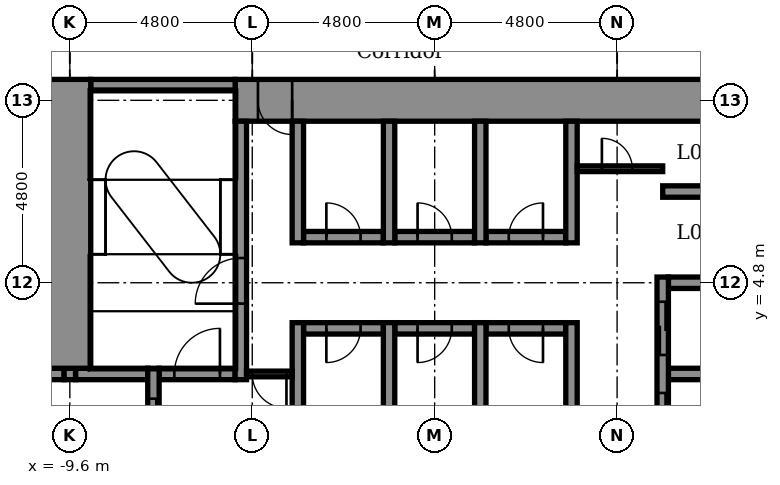
"""IFC4 building model, lengths in metres.
Left out: names, types, materials, properties, quantities, classifications, styles, units other than length and angle.
Written with IfcOpenShell. Run it as: python <this file> out.ifc"""

import sys

from ifc_helpers import new_model, si_unit, direction, frame, frame_2d, origin, place, context, subcontext, project, spatial, rectangle, extrude, element, fill, save


model = new_model("IFC4")
c1 = context("Model", 3, precision=1e-05, world=origin(), true_north=direction((0.0, 1.0)))
c2 = subcontext(c1, "Body", "Model", "MODEL_VIEW")
j1 = project(units=[si_unit("LENGTHUNIT", "METRE"), si_unit("PLANEANGLEUNIT", "RADIAN")], contexts=[c1])
p1 = place(None, origin())
s1 = spatial("IfcSite", under=j1, at=p1, CompositionType="ELEMENT")
p2 = place(p1, origin())
s2 = spatial("IfcBuilding", under=s1, at=p2, CompositionType="ELEMENT")
p3 = place(p2, frame((0.0, 0.0, 38.9)))
s3 = spatial("IfcBuildingStorey", under=s2, at=p3, CompositionType="ELEMENT", Elevation=38.9)
p4 = place(p3, frame((-10.85, 2.4, -0.25), z_axis=(0.0, 0.0, 1.0), x_axis=(1.0, 0.0, 0.0)))
e1 = element("IfcWall", 1, at=p4, inside=s3, PredefinedType="STANDARD", context=c2, shape_type="SweptSolid", body=[
    extrude(rectangle(XDim=1.1, YDim=0.3, at=frame_2d((0.55, 0.0))), origin(), (0.0, 0.0, 1.0), 5.5),
])
p5 = place(p3, frame((-9.45, 2.4, -0.25), z_axis=(0.0, 0.0, 1.0), x_axis=(1.0, 0.0, 0.0)))
e2 = element("IfcWall", 2, at=p5, inside=s3, PredefinedType="STANDARD", context=c2, shape_type="SweptSolid", body=[
    extrude(rectangle(XDim=1.9, YDim=0.3, at=frame_2d((0.95, 0.0))), origin(), (0.0, 0.0, 1.0), 5.5),
])
p6 = place(p3, frame((-7.25, 2.4, -0.25), z_axis=(0.0, 0.0, 1.0), x_axis=(1.0, 0.0, 0.0)))
e3 = element("IfcWall", 3, at=p6, inside=s3, PredefinedType="STANDARD", context=c2, shape_type="SweptSolid", body=[
    extrude(rectangle(XDim=2.0, YDim=0.3, at=frame_2d((1.0, 0.0))), origin(), (0.0, 0.0, 1.0), 5.5),
])
p7 = place(p6, frame((0.4, 0.0, 0.25)))
e4 = element("IfcOpeningElement", 4, at=p7, cuts=e3, PredefinedType="OPENING", context=c2, shape_type="SweptSolid", body=[
    extrude(rectangle(XDim=1.2, YDim=2.1, at=frame_2d((0.6, 1.05))), frame((0.0, 0.16, 0.0), z_axis=(0.0, -1.0, 0.0), x_axis=(1.0, 0.0, 0.0)), (0.0, 0.0, 1.0), 0.32),
])
p8 = place(p3, frame((6.15, 2.4, -0.25), z_axis=(0.0, 0.0, 1.0), x_axis=(1.0, 0.0, 0.0)))
e5 = element("IfcWall", 5, at=p8, inside=s3, PredefinedType="STANDARD", context=c2, shape_type="SweptSolid", body=[
    extrude(rectangle(XDim=2.9, YDim=0.3, at=frame_2d((1.45, 0.0))), origin(), (0.0, 0.0, 1.0), 5.5),
])
p9 = place(p3, frame((-3.45, 3.6, -0.25), z_axis=(0.0, 0.0, 1.0), x_axis=(1.0, 0.0, 0.0)))
e6 = element("IfcWall", 6, at=p9, inside=s3, PredefinedType="STANDARD", context=c2, shape_type="SweptSolid", body=[
    extrude(rectangle(XDim=2.1, YDim=0.3, at=frame_2d((1.05, 0.0))), origin(), (0.0, 0.0, 1.0), 5.5),
])
p10 = place(p9, frame((0.6, 0.0, 0.25)))
e7 = element("IfcOpeningElement", 7, at=p10, cuts=e6, PredefinedType="OPENING", context=c2, shape_type="SweptSolid", body=[
    extrude(rectangle(XDim=0.9, YDim=2.1, at=frame_2d((0.45, 1.05))), frame((0.0, 0.16, 0.0), z_axis=(0.0, -1.0, 0.0), x_axis=(1.0, 0.0, 0.0)), (0.0, 0.0, 1.0), 0.32),
])
p11 = place(p3, frame((-1.05, 3.6, -0.25), z_axis=(0.0, 0.0, 1.0), x_axis=(1.0, 0.0, 0.0)))
e8 = element("IfcWall", 8, at=p11, inside=s3, PredefinedType="STANDARD", context=c2, shape_type="SweptSolid", body=[
    extrude(rectangle(XDim=2.1, YDim=0.3, at=frame_2d((1.05, 0.0))), origin(), (0.0, 0.0, 1.0), 5.5),
])
p12 = place(p11, frame((0.6, 0.0, 0.25)))
e9 = element("IfcOpeningElement", 9, at=p12, cuts=e8, PredefinedType="OPENING", context=c2, shape_type="SweptSolid", body=[
    extrude(rectangle(XDim=0.9, YDim=2.1, at=frame_2d((0.45, 1.05))), frame((0.0, 0.16, 0.0), z_axis=(0.0, -1.0, 0.0), x_axis=(1.0, 0.0, 0.0)), (0.0, 0.0, 1.0), 0.32),
])
p13 = place(p3, frame((1.35, 3.6, -0.25), z_axis=(0.0, 0.0, 1.0), x_axis=(1.0, 0.0, 0.0)))
e10 = element("IfcWall", 10, at=p13, inside=s3, PredefinedType="STANDARD", context=c2, shape_type="SweptSolid", body=[
    extrude(rectangle(XDim=2.1, YDim=0.3, at=frame_2d((1.05, 0.0))), origin(), (0.0, 0.0, 1.0), 5.5),
])
p14 = place(p13, frame((0.6, 0.0, 0.25)))
e11 = element("IfcOpeningElement", 11, at=p14, cuts=e10, PredefinedType="OPENING", context=c2, shape_type="SweptSolid", body=[
    extrude(rectangle(XDim=0.9, YDim=2.1, at=frame_2d((0.45, 1.05))), frame((0.0, 0.16, 0.0), z_axis=(0.0, -1.0, 0.0), x_axis=(1.0, 0.0, 0.0)), (0.0, 0.0, 1.0), 0.32),
])
p15 = place(p3, frame((6.15, 4.8, -0.25), z_axis=(0.0, 0.0, 1.0), x_axis=(1.0, 0.0, 0.0)))
e12 = element("IfcWall", 12, at=p15, inside=s3, PredefinedType="STANDARD", context=c2, shape_type="SweptSolid", body=[
    extrude(rectangle(XDim=2.9, YDim=0.3, at=frame_2d((1.45, 0.0))), origin(), (0.0, 0.0, 1.0), 5.5),
])
p16 = place(p3, frame((-3.45, 6.0, -0.25), z_axis=(0.0, 0.0, 1.0), x_axis=(1.0, 0.0, 0.0)))
e13 = element("IfcWall", 13, at=p16, inside=s3, PredefinedType="STANDARD", context=c2, shape_type="SweptSolid", body=[
    extrude(rectangle(XDim=2.1, YDim=0.3, at=frame_2d((1.05, 0.0))), origin(), (0.0, 0.0, 1.0), 5.5),
])
p17 = place(p16, frame((0.6, 0.0, 0.25)))
e14 = element("IfcOpeningElement", 14, at=p17, cuts=e13, PredefinedType="OPENING", context=c2, shape_type="SweptSolid", body=[
    extrude(rectangle(XDim=0.9, YDim=2.1, at=frame_2d((0.45, 1.05))), frame((0.0, 0.16, 0.0), z_axis=(0.0, -1.0, 0.0), x_axis=(1.0, 0.0, 0.0)), (0.0, 0.0, 1.0), 0.32),
])
p18 = place(p3, frame((-1.05, 6.0, -0.25), z_axis=(0.0, 0.0, 1.0), x_axis=(1.0, 0.0, 0.0)))
e15 = element("IfcWall", 15, at=p18, inside=s3, PredefinedType="STANDARD", context=c2, shape_type="SweptSolid", body=[
    extrude(rectangle(XDim=2.1, YDim=0.3, at=frame_2d((1.05, 0.0))), origin(), (0.0, 0.0, 1.0), 5.5),
])
p19 = place(p18, frame((0.6, 0.0, 0.25)))
e16 = element("IfcOpeningElement", 16, at=p19, cuts=e15, PredefinedType="OPENING", context=c2, shape_type="SweptSolid", body=[
    extrude(rectangle(XDim=0.9, YDim=2.1, at=frame_2d((0.45, 1.05))), frame((0.0, 0.16, 0.0), z_axis=(0.0, -1.0, 0.0), x_axis=(1.0, 0.0, 0.0)), (0.0, 0.0, 1.0), 0.32),
])
p20 = place(p3, frame((1.35, 6.0, -0.25), z_axis=(0.0, 0.0, 1.0), x_axis=(1.0, 0.0, 0.0)))
e17 = element("IfcWall", 17, at=p20, inside=s3, PredefinedType="STANDARD", context=c2, shape_type="SweptSolid", body=[
    extrude(rectangle(XDim=2.1, YDim=0.3, at=frame_2d((1.05, 0.0))), origin(), (0.0, 0.0, 1.0), 5.5),
])
p21 = place(p20, frame((0.6, 0.0, 0.25)))
e18 = element("IfcOpeningElement", 18, at=p21, cuts=e17, PredefinedType="OPENING", context=c2, shape_type="SweptSolid", body=[
    extrude(rectangle(XDim=0.9, YDim=2.1, at=frame_2d((0.45, 1.05))), frame((0.0, 0.16, 0.0), z_axis=(0.0, -1.0, 0.0), x_axis=(1.0, 0.0, 0.0)), (0.0, 0.0, 1.0), 0.32),
])
p22 = place(p3, frame((6.0, 7.2, -0.25), z_axis=(0.0, 0.0, 1.0), x_axis=(1.0, 0.0, 0.0)))
e19 = element("IfcWall", 19, at=p22, inside=s3, PredefinedType="STANDARD", context=c2, shape_type="SweptSolid", body=[
    extrude(rectangle(XDim=3.05, YDim=0.3, at=frame_2d((1.525, 0.0))), origin(), (0.0, 0.0, 1.0), 5.5),
])
p23 = place(p3, frame((-5.25, 9.6, -0.25), z_axis=(0.0, 0.0, 1.0), x_axis=(1.0, 0.0, 0.0)))
e20 = element("IfcWall", 20, at=p23, inside=s3, PredefinedType="SHEAR", context=c2, shape_type="SweptSolid", body=[
    extrude(rectangle(XDim=14.3, YDim=1.1, at=frame_2d((7.15, 0.0))), origin(), (0.0, 0.0, 1.0), 5.5),
])
p24 = place(p23, frame((0.6, 0.0, 0.25)))
e21 = element("IfcOpeningElement", 21, at=p24, cuts=e20, PredefinedType="OPENING", context=c2, shape_type="SweptSolid", body=[
    extrude(rectangle(XDim=0.9, YDim=2.1, at=frame_2d((0.45, 1.05))), frame((0.0, 0.56, 0.0), z_axis=(0.0, -1.0, 0.0), x_axis=(1.0, 0.0, 0.0)), (0.0, 0.0, 1.0), 1.12),
])
p25 = place(p3, frame((-9.05, 10.0, -0.25), z_axis=(0.0, 0.0, 1.0), x_axis=(1.0, 0.0, 0.0)))
e22 = element("IfcWall", 22, at=p25, inside=s3, PredefinedType="STANDARD", context=c2, shape_type="SweptSolid", body=[
    extrude(rectangle(XDim=3.8, YDim=0.3, at=frame_2d((1.9, 0.0))), origin(), (0.0, 0.0, 1.0), 5.5),
])
p26 = place(p3, frame((-9.6, 2.25, -0.25), z_axis=(0.0, 0.0, 1.0), x_axis=(0.0, 1.0, 0.0)))
e23 = element("IfcWall", 23, at=p26, inside=s3, PredefinedType="STANDARD", context=c2, shape_type="SweptSolid", body=[
    extrude(rectangle(XDim=0.3, YDim=0.3, at=frame_2d((0.15, 0.0))), origin(), (0.0, 0.0, 1.0), 5.5),
])
p27 = place(p3, frame((-9.6, 2.55, -0.25), z_axis=(0.0, 0.0, 1.0), x_axis=(0.0, 1.0, 0.0)))
e24 = element("IfcWall", 24, at=p27, inside=s3, PredefinedType="SHEAR", context=c2, shape_type="SweptSolid", body=[
    extrude(rectangle(XDim=7.6, YDim=1.1, at=frame_2d((3.8, 0.0))), origin(), (0.0, 0.0, 1.0), 5.5),
])
p28 = place(p3, frame((-7.4, -2.55, -0.25), z_axis=(0.0, 0.0, 1.0), x_axis=(0.0, 1.0, 0.0)))
e25 = element("IfcWall", 25, at=p28, inside=s3, PredefinedType="STANDARD", context=c2, shape_type="SweptSolid", body=[
    extrude(rectangle(XDim=5.1, YDim=0.3, at=frame_2d((2.55, 0.0))), origin(), (0.0, 0.0, 1.0), 5.5),
])
p29 = place(p28, frame((0.8, 0.0, 0.25)))
e26 = element("IfcOpeningElement", 26, at=p29, cuts=e25, PredefinedType="OPENING", context=c2, shape_type="SweptSolid", body=[
    extrude(rectangle(XDim=1.1, YDim=2.1, at=frame_2d((0.55, 1.05))), frame((0.0, 0.16, 0.0), z_axis=(0.0, -1.0, 0.0), x_axis=(1.0, 0.0, 0.0)), (0.0, 0.0, 1.0), 0.32),
])
p30 = place(p28, frame((3.2, 0.0, 0.25)))
e27 = element("IfcOpeningElement", 27, at=p30, cuts=e25, PredefinedType="OPENING", context=c2, shape_type="SweptSolid", body=[
    extrude(rectangle(XDim=1.1, YDim=2.1, at=frame_2d((0.55, 1.05))), frame((0.0, 0.16, 0.0), z_axis=(0.0, -1.0, 0.0), x_axis=(1.0, 0.0, 0.0)), (0.0, 0.0, 1.0), 0.32),
])
p31 = place(p3, frame((-5.1, 2.25, -0.25), z_axis=(0.0, 0.0, 1.0), x_axis=(0.0, 1.0, 0.0)))
e28 = element("IfcWall", 28, at=p31, inside=s3, PredefinedType="STANDARD", context=c2, shape_type="SweptSolid", body=[
    extrude(rectangle(XDim=6.8, YDim=0.3, at=frame_2d((3.4, 0.0))), origin(), (0.0, 0.0, 1.0), 5.5),
])
p32 = place(p31, frame((2.0, 0.0, 0.25)))
e29 = element("IfcOpeningElement", 29, at=p32, cuts=e28, PredefinedType="OPENING", context=c2, shape_type="SweptSolid", body=[
    extrude(rectangle(XDim=1.2, YDim=2.1, at=frame_2d((0.6, 1.05))), frame((0.0, 0.16, 0.0), z_axis=(0.0, -1.0, 0.0), x_axis=(1.0, 0.0, 0.0)), (0.0, 0.0, 1.0), 0.32),
])
p33 = place(p3, frame((-3.6, -3.75, -0.25), z_axis=(0.0, 0.0, 1.0), x_axis=(0.0, 1.0, 0.0)))
e30 = element("IfcWall", 30, at=p33, inside=s3, PredefinedType="STANDARD", context=c2, shape_type="SweptSolid", body=[
    extrude(rectangle(XDim=7.5, YDim=0.3, at=frame_2d((3.75, 0.0))), origin(), (0.0, 0.0, 1.0), 5.5),
])
p34 = place(p3, frame((-3.6, 5.85, -0.25), z_axis=(0.0, 0.0, 1.0), x_axis=(0.0, 1.0, 0.0)))
e31 = element("IfcWall", 31, at=p34, inside=s3, PredefinedType="STANDARD", context=c2, shape_type="SweptSolid", body=[
    extrude(rectangle(XDim=3.2, YDim=0.3, at=frame_2d((1.6, 0.0))), origin(), (0.0, 0.0, 1.0), 5.5),
])
p35 = place(p3, frame((-1.2, -3.75, -0.25), z_axis=(0.0, 0.0, 1.0), x_axis=(0.0, 1.0, 0.0)))
e32 = element("IfcWall", 32, at=p35, inside=s3, PredefinedType="STANDARD", context=c2, shape_type="SweptSolid", body=[
    extrude(rectangle(XDim=7.5, YDim=0.3, at=frame_2d((3.75, 0.0))), origin(), (0.0, 0.0, 1.0), 5.5),
])
p36 = place(p3, frame((-1.2, 5.85, -0.25), z_axis=(0.0, 0.0, 1.0), x_axis=(0.0, 1.0, 0.0)))
e33 = element("IfcWall", 33, at=p36, inside=s3, PredefinedType="STANDARD", context=c2, shape_type="SweptSolid", body=[
    extrude(rectangle(XDim=3.2, YDim=0.3, at=frame_2d((1.6, 0.0))), origin(), (0.0, 0.0, 1.0), 5.5),
])
p37 = place(p3, frame((1.2, -3.75, -0.25), z_axis=(0.0, 0.0, 1.0), x_axis=(0.0, 1.0, 0.0)))
e34 = element("IfcWall", 34, at=p37, inside=s3, PredefinedType="STANDARD", context=c2, shape_type="SweptSolid", body=[
    extrude(rectangle(XDim=7.5, YDim=0.3, at=frame_2d((3.75, 0.0))), origin(), (0.0, 0.0, 1.0), 5.5),
])
p38 = place(p3, frame((1.2, 5.85, -0.25), z_axis=(0.0, 0.0, 1.0), x_axis=(0.0, 1.0, 0.0)))
e35 = element("IfcWall", 35, at=p38, inside=s3, PredefinedType="STANDARD", context=c2, shape_type="SweptSolid", body=[
    extrude(rectangle(XDim=3.2, YDim=0.3, at=frame_2d((1.6, 0.0))), origin(), (0.0, 0.0, 1.0), 5.5),
])
p39 = place(p3, frame((3.6, -3.75, -0.25), z_axis=(0.0, 0.0, 1.0), x_axis=(0.0, 1.0, 0.0)))
e36 = element("IfcWall", 36, at=p39, inside=s3, PredefinedType="STANDARD", context=c2, shape_type="SweptSolid", body=[
    extrude(rectangle(XDim=7.5, YDim=0.3, at=frame_2d((3.75, 0.0))), origin(), (0.0, 0.0, 1.0), 5.5),
])
p40 = place(p3, frame((3.6, 5.85, -0.25), z_axis=(0.0, 0.0, 1.0), x_axis=(0.0, 1.0, 0.0)))
e37 = element("IfcWall", 37, at=p40, inside=s3, PredefinedType="STANDARD", context=c2, shape_type="SweptSolid", body=[
    extrude(rectangle(XDim=3.2, YDim=0.3, at=frame_2d((1.6, 0.0))), origin(), (0.0, 0.0, 1.0), 5.5),
])
p41 = place(p3, frame((6.0, -2.55, -0.25), z_axis=(0.0, 0.0, 1.0), x_axis=(0.0, 1.0, 0.0)))
e38 = element("IfcWall", 38, at=p41, inside=s3, PredefinedType="STANDARD", context=c2, shape_type="SweptSolid", body=[
    extrude(rectangle(XDim=7.5, YDim=0.3, at=frame_2d((3.75, 0.0))), origin(), (0.0, 0.0, 1.0), 5.5),
])
p42 = place(p41, frame((0.65, 0.0, 0.25)))
e39 = element("IfcOpeningElement", 39, at=p42, cuts=e38, PredefinedType="OPENING", context=c2, shape_type="SweptSolid", body=[
    extrude(rectangle(XDim=1.4, YDim=2.1, at=frame_2d((0.7, 1.05))), frame((0.0, 0.16, 0.0), z_axis=(0.0, -1.0, 0.0), x_axis=(1.0, 0.0, 0.0)), (0.0, 0.0, 1.0), 0.32),
])
p43 = place(p41, frame((3.05, 0.0, 0.25)))
e40 = element("IfcOpeningElement", 40, at=p43, cuts=e38, PredefinedType="OPENING", context=c2, shape_type="SweptSolid", body=[
    extrude(rectangle(XDim=1.4, YDim=2.1, at=frame_2d((0.7, 1.05))), frame((0.0, 0.16, 0.0), z_axis=(0.0, -1.0, 0.0), x_axis=(1.0, 0.0, 0.0)), (0.0, 0.0, 1.0), 0.32),
])
p44 = place(p41, frame((5.45, 0.0, 0.25)))
e41 = element("IfcOpeningElement", 41, at=p44, cuts=e38, PredefinedType="OPENING", context=c2, shape_type="SweptSolid", body=[
    extrude(rectangle(XDim=1.4, YDim=2.1, at=frame_2d((0.7, 1.05))), frame((0.0, 0.16, 0.0), z_axis=(0.0, -1.0, 0.0), x_axis=(1.0, 0.0, 0.0)), (0.0, 0.0, 1.0), 0.32),
])
p45 = place(p3, frame((3.75, 7.8, 0.0), z_axis=(0.0, 0.0, 1.0), x_axis=(1.0, 0.0, 0.0)))
e42 = element("IfcWall", 42, at=p45, inside=s3, PredefinedType="PARTITIONING", context=c2, shape_type="SweptSolid", body=[
    extrude(rectangle(XDim=2.25, YDim=0.15, at=frame_2d((1.125, 0.0))), origin(), (0.0, 0.0, 1.0), 5.25),
])
p46 = place(p45, frame((0.65, 0.0, 0.0)))
e43 = element("IfcOpeningElement", 43, at=p46, cuts=e42, PredefinedType="OPENING", context=c2, shape_type="SweptSolid", body=[
    extrude(rectangle(XDim=0.8, YDim=2.1, at=frame_2d((0.4, 1.05))), frame((0.0, 0.085, 0.0), z_axis=(0.0, -1.0, 0.0), x_axis=(1.0, 0.0, 0.0)), (0.0, 0.0, 1.0), 0.17),
])
p47 = place(p3, frame((-4.95, 2.4, 0.0), z_axis=(0.0, 0.0, 1.0), x_axis=(1.0, 0.0, 0.0)))
e44 = element("IfcWall", 44, at=p47, inside=s3, PredefinedType="PARTITIONING", context=c2, shape_type="SweptSolid", body=[
    extrude(rectangle(XDim=1.2, YDim=0.15, at=frame_2d((0.6, 0.0))), origin(), (0.0, 0.0, 1.0), 5.25),
])
p48 = place(p47, frame((0.15, 0.0, 0.0)))
e45 = element("IfcOpeningElement", 45, at=p48, cuts=e44, PredefinedType="OPENING", context=c2, shape_type="SweptSolid", body=[
    extrude(rectangle(XDim=0.9, YDim=2.1, at=frame_2d((0.45, 1.05))), frame((0.0, 0.085, 0.0), z_axis=(0.0, -1.0, 0.0), x_axis=(1.0, 0.0, 0.0)), (0.0, 0.0, 1.0), 0.17),
])
p49 = place(p46, origin())
e46 = element("IfcDoor", 46, at=p49, inside=s3, OperationType="SINGLE_SWING_LEFT", PredefinedType="DOOR", context=c2, shape_type="SweptSolid", body=[
    extrude(rectangle(XDim=0.8, YDim=2.1, at=frame_2d((0.4, 1.05))), frame((0.0, 0.025, 0.0), z_axis=(0.0, -1.0, 0.0), x_axis=(1.0, 0.0, 0.0)), (0.0, 0.0, 1.0), 0.05),
])
fill(e43, e46)
p50 = place(p30, origin())
e47 = element("IfcDoor", 47, at=p50, inside=s3, OperationType="DOUBLE_DOOR_SLIDING", PredefinedType="DOOR", context=c2, shape_type="SweptSolid", body=[
    extrude(rectangle(XDim=1.1, YDim=2.1, at=frame_2d((0.55, 1.05))), frame((0.0, 0.025, 0.0), z_axis=(0.0, -1.0, 0.0), x_axis=(1.0, 0.0, 0.0)), (0.0, 0.0, 1.0), 0.05),
])
fill(e27, e47)
p51 = place(p43, origin())
e48 = element("IfcDoor", 48, at=p51, inside=s3, OperationType="DOUBLE_DOOR_SLIDING", PredefinedType="DOOR", context=c2, shape_type="SweptSolid", body=[
    extrude(rectangle(XDim=1.4, YDim=2.1, at=frame_2d((0.7, 1.05))), frame((0.0, 0.025, 0.0), z_axis=(0.0, -1.0, 0.0), x_axis=(1.0, 0.0, 0.0)), (0.0, 0.0, 1.0), 0.05),
])
fill(e40, e48)
p52 = place(p44, origin())
e49 = element("IfcDoor", 49, at=p52, inside=s3, OperationType="DOUBLE_DOOR_SLIDING", PredefinedType="DOOR", context=c2, shape_type="SweptSolid", body=[
    extrude(rectangle(XDim=1.4, YDim=2.1, at=frame_2d((0.7, 1.05))), frame((0.0, 0.025, 0.0), z_axis=(0.0, -1.0, 0.0), x_axis=(1.0, 0.0, 0.0)), (0.0, 0.0, 1.0), 0.05),
])
fill(e41, e49)
p53 = place(p32, origin())
e50 = element("IfcDoor", 50, at=p53, inside=s3, OperationType="SINGLE_SWING_LEFT", PredefinedType="DOOR", context=c2, shape_type="SweptSolid", body=[
    extrude(rectangle(XDim=1.2, YDim=2.1, at=frame_2d((0.6, 1.05))), frame((0.0, 0.025, 0.0), z_axis=(0.0, -1.0, 0.0), x_axis=(1.0, 0.0, 0.0)), (0.0, 0.0, 1.0), 0.05),
])
fill(e29, e50)
p54 = place(p17, origin())
e51 = element("IfcDoor", 51, at=p54, inside=s3, OperationType="SINGLE_SWING_LEFT", PredefinedType="DOOR", context=c2, shape_type="SweptSolid", body=[
    extrude(rectangle(XDim=0.9, YDim=2.1, at=frame_2d((0.45, 1.05))), frame((0.0, 0.025, 0.0), z_axis=(0.0, -1.0, 0.0), x_axis=(1.0, 0.0, 0.0)), (0.0, 0.0, 1.0), 0.05),
])
fill(e14, e51)
p55 = place(p19, origin())
e52 = element("IfcDoor", 52, at=p55, inside=s3, OperationType="SINGLE_SWING_LEFT", PredefinedType="DOOR", context=c2, shape_type="SweptSolid", body=[
    extrude(rectangle(XDim=0.9, YDim=2.1, at=frame_2d((0.45, 1.05))), frame((0.0, 0.025, 0.0), z_axis=(0.0, -1.0, 0.0), x_axis=(1.0, 0.0, 0.0)), (0.0, 0.0, 1.0), 0.05),
])
fill(e16, e52)
p56 = place(p21, origin())
e53 = element("IfcDoor", 53, at=p56, inside=s3, OperationType="SINGLE_SWING_RIGHT", PredefinedType="DOOR", context=c2, shape_type="SweptSolid", body=[
    extrude(rectangle(XDim=0.9, YDim=2.1, at=frame_2d((0.45, 1.05))), frame((0.0, 0.025, 0.0), z_axis=(0.0, -1.0, 0.0), x_axis=(1.0, 0.0, 0.0)), (0.0, 0.0, 1.0), 0.05),
])
fill(e18, e53)
p57 = place(p10, frame((0.9, 0.0, 0.0), z_axis=(0.0, 0.0, 1.0), x_axis=(-1.0, 0.0, 0.0)))
e54 = element("IfcDoor", 54, at=p57, inside=s3, OperationType="SINGLE_SWING_LEFT", PredefinedType="DOOR", context=c2, shape_type="SweptSolid", body=[
    extrude(rectangle(XDim=0.9, YDim=2.1, at=frame_2d((0.45, 1.05))), frame((0.0, 0.025, 0.0), z_axis=(0.0, -1.0, 0.0), x_axis=(1.0, 0.0, 0.0)), (0.0, 0.0, 1.0), 0.05),
])
fill(e7, e54)
p58 = place(p12, frame((0.9, 0.0, 0.0), z_axis=(0.0, 0.0, 1.0), x_axis=(-1.0, 0.0, 0.0)))
e55 = element("IfcDoor", 55, at=p58, inside=s3, OperationType="SINGLE_SWING_LEFT", PredefinedType="DOOR", context=c2, shape_type="SweptSolid", body=[
    extrude(rectangle(XDim=0.9, YDim=2.1, at=frame_2d((0.45, 1.05))), frame((0.0, 0.025, 0.0), z_axis=(0.0, -1.0, 0.0), x_axis=(1.0, 0.0, 0.0)), (0.0, 0.0, 1.0), 0.05),
])
fill(e9, e55)
p59 = place(p14, frame((0.9, 0.0, 0.0), z_axis=(0.0, 0.0, 1.0), x_axis=(-1.0, 0.0, 0.0)))
e56 = element("IfcDoor", 56, at=p59, inside=s3, OperationType="SINGLE_SWING_RIGHT", PredefinedType="DOOR", context=c2, shape_type="SweptSolid", body=[
    extrude(rectangle(XDim=0.9, YDim=2.1, at=frame_2d((0.45, 1.05))), frame((0.0, 0.025, 0.0), z_axis=(0.0, -1.0, 0.0), x_axis=(1.0, 0.0, 0.0)), (0.0, 0.0, 1.0), 0.05),
])
fill(e11, e56)
p60 = place(p24, frame((0.9, 0.0, 0.0), z_axis=(0.0, 0.0, 1.0), x_axis=(-1.0, 0.0, 0.0)))
e57 = element("IfcDoor", 57, at=p60, inside=s3, OperationType="SINGLE_SWING_RIGHT", PredefinedType="DOOR", context=c2, shape_type="SweptSolid", body=[
    extrude(rectangle(XDim=0.9, YDim=2.1, at=frame_2d((0.45, 1.05))), frame((0.0, 0.025, 0.0), z_axis=(0.0, -1.0, 0.0), x_axis=(1.0, 0.0, 0.0)), (0.0, 0.0, 1.0), 0.05),
])
fill(e21, e57)
p61 = place(p48, frame((0.9, 0.0, 0.0), z_axis=(0.0, 0.0, 1.0), x_axis=(-1.0, 0.0, 0.0)))
e58 = element("IfcDoor", 58, at=p61, inside=s3, OperationType="SINGLE_SWING_RIGHT", PredefinedType="DOOR", context=c2, shape_type="SweptSolid", body=[
    extrude(rectangle(XDim=0.9, YDim=2.1, at=frame_2d((0.45, 1.05))), frame((0.0, 0.025, 0.0), z_axis=(0.0, -1.0, 0.0), x_axis=(1.0, 0.0, 0.0)), (0.0, 0.0, 1.0), 0.05),
])
fill(e45, e58)
p62 = place(p7, origin())
e59 = element("IfcDoor", 59, at=p62, inside=s3, OperationType="SINGLE_SWING_RIGHT", PredefinedType="DOOR", context=c2, shape_type="SweptSolid", body=[
    extrude(rectangle(XDim=1.2, YDim=2.1, at=frame_2d((0.6, 1.05))), frame((0.0, 0.025, 0.0), z_axis=(0.0, -1.0, 0.0), x_axis=(1.0, 0.0, 0.0)), (0.0, 0.0, 1.0), 0.05),
])
fill(e4, e59)
save(model, sys.argv[1])
